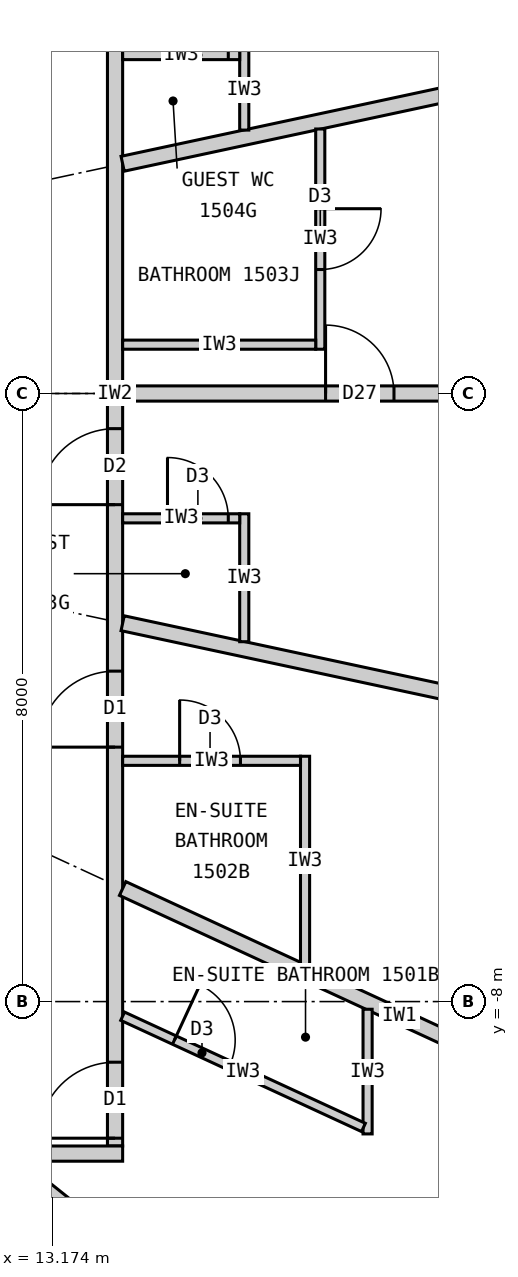
"""IFC4 building model, lengths in metres.
Left out: names, types, materials, properties, quantities, classifications, styles, units other than length and angle.
Written with IfcOpenShell. Run it as: python <this file> out.ifc"""

import sys

from ifc_helpers import new_model, si_unit, direction, frame, frame_2d, origin, place, context, subcontext, project, spatial, rectangle, extrude, element, fill, save


model = new_model("IFC4")
c1 = context("Model", 3, precision=1e-05, world=origin(), true_north=direction((0.0, 1.0)))
c2 = subcontext(c1, "Body", "Model", "MODEL_VIEW")
j1 = project(units=[si_unit("LENGTHUNIT", "METRE"), si_unit("PLANEANGLEUNIT", "RADIAN")], contexts=[c1])
p1 = place(None, origin())
s1 = spatial("IfcSite", under=j1, at=p1, CompositionType="ELEMENT")
p2 = place(p1, origin())
s2 = spatial("IfcBuilding", under=s1, at=p2, CompositionType="ELEMENT")
p3 = place(p2, frame((0.0, 0.0, 63.9)))
s3 = spatial("IfcBuildingStorey", under=s2, at=p3, CompositionType="ELEMENT", Elevation=63.9)
p4 = place(p3, frame((14.0, -9.9, 0.0), z_axis=(0.0, 0.0, 1.0), x_axis=(0.0, 1.0, 0.0)))
e1 = element("IfcWall", 1, at=p4, inside=s3, PredefinedType="PARTITIONING", context=c2, shape_type="SweptSolid", body=[
    extrude(rectangle(XDim=19.8, YDim=0.2, at=frame_2d((9.9, 0.0))), origin(), (0.0, 0.0, 1.0), 3.12),
])
p5 = place(p4, frame((0.103, 0.0, 0.0)))
e2 = element("IfcOpeningElement", 2, at=p5, cuts=e1, PredefinedType="OPENING", context=c2, shape_type="SweptSolid", body=[
    extrude(rectangle(XDim=1.0, YDim=2.2, at=frame_2d((0.5, 1.1))), frame((0.0, 0.11, 0.0), z_axis=(0.0, -1.0, 0.0), x_axis=(1.0, 0.0, 0.0)), (0.0, 0.0, 1.0), 0.22),
])
p6 = place(p4, frame((5.248, 0.0, 0.0)))
e3 = element("IfcOpeningElement", 3, at=p6, cuts=e1, PredefinedType="OPENING", context=c2, shape_type="SweptSolid", body=[
    extrude(rectangle(XDim=1.0, YDim=2.2, at=frame_2d((0.5, 1.1))), frame((0.0, 0.11, 0.0), z_axis=(0.0, -1.0, 0.0), x_axis=(1.0, 0.0, 0.0)), (0.0, 0.0, 1.0), 0.22),
])
p7 = place(p4, frame((8.438, 0.0, 0.0)))
e4 = element("IfcOpeningElement", 4, at=p7, cuts=e1, PredefinedType="OPENING", context=c2, shape_type="SweptSolid", body=[
    extrude(rectangle(XDim=1.0, YDim=2.2, at=frame_2d((0.5, 1.1))), frame((0.0, 0.11, 0.0), z_axis=(0.0, -1.0, 0.0), x_axis=(1.0, 0.0, 0.0)), (0.0, 0.0, 1.0), 0.22),
])
p8 = place(p4, frame((14.532, 0.0, 0.0)))
e5 = element("IfcOpeningElement", 5, at=p8, cuts=e1, PredefinedType="OPENING", context=c2, shape_type="SweptSolid", body=[
    extrude(rectangle(XDim=1.0, YDim=2.2, at=frame_2d((0.5, 1.1))), frame((0.0, 0.11, 0.0), z_axis=(0.0, -1.0, 0.0), x_axis=(1.0, 0.0, 0.0)), (0.0, 0.0, 1.0), 0.22),
])
p9 = place(p3, frame((14.1, -10.0, 0.0), z_axis=(0.0, 0.0, 1.0), x_axis=(-1.0, 0.0, 0.0)))
e6 = element("IfcWall", 6, at=p9, inside=s3, PredefinedType="PARTITIONING", context=c2, shape_type="SweptSolid", body=[
    extrude(rectangle(XDim=28.2, YDim=0.2, at=frame_2d((14.1, 0.0))), origin(), (0.0, 0.0, 1.0), 3.12),
])
p10 = place(p9, frame((23.865, 0.0, 0.0)))
e7 = element("IfcOpeningElement", 7, at=p10, cuts=e6, PredefinedType="OPENING", context=c2, shape_type="SweptSolid", body=[
    extrude(rectangle(XDim=1.0, YDim=2.2, at=frame_2d((0.5, 1.1))), frame((0.0, 0.11, 0.0), z_axis=(0.0, -1.0, 0.0), x_axis=(1.0, 0.0, 0.0)), (0.0, 0.0, 1.0), 0.22),
])
p11 = place(p9, frame((18.529, 0.0, 0.0)))
e8 = element("IfcOpeningElement", 8, at=p11, cuts=e6, PredefinedType="OPENING", context=c2, shape_type="SweptSolid", body=[
    extrude(rectangle(XDim=1.0, YDim=2.2, at=frame_2d((0.5, 1.1))), frame((0.0, 0.11, 0.0), z_axis=(0.0, -1.0, 0.0), x_axis=(1.0, 0.0, 0.0)), (0.0, 0.0, 1.0), 0.22),
])
p12 = place(p9, frame((14.623, 0.0, 0.0)))
e9 = element("IfcOpeningElement", 9, at=p12, cuts=e6, PredefinedType="OPENING", context=c2, shape_type="SweptSolid", body=[
    extrude(rectangle(XDim=1.0, YDim=2.2, at=frame_2d((0.5, 1.1))), frame((0.0, 0.11, 0.0), z_axis=(0.0, -1.0, 0.0), x_axis=(1.0, 0.0, 0.0)), (0.0, 0.0, 1.0), 0.22),
])
p13 = place(p9, frame((11.24, 0.0, 0.0)))
e10 = element("IfcOpeningElement", 10, at=p13, cuts=e6, PredefinedType="OPENING", context=c2, shape_type="SweptSolid", body=[
    extrude(rectangle(XDim=1.0, YDim=2.2, at=frame_2d((0.5, 1.1))), frame((0.0, 0.11, 0.0), z_axis=(0.0, -1.0, 0.0), x_axis=(1.0, 0.0, 0.0)), (0.0, 0.0, 1.0), 0.22),
])
p14 = place(p9, frame((8.671, 0.0, 0.0)))
e11 = element("IfcOpeningElement", 11, at=p14, cuts=e6, PredefinedType="OPENING", context=c2, shape_type="SweptSolid", body=[
    extrude(rectangle(XDim=1.0, YDim=2.2, at=frame_2d((0.5, 1.1))), frame((0.0, 0.11, 0.0), z_axis=(0.0, -1.0, 0.0), x_axis=(1.0, 0.0, 0.0)), (0.0, 0.0, 1.0), 0.22),
])
p15 = place(p9, frame((2.801, 0.0, 0.0)))
e12 = element("IfcOpeningElement", 12, at=p15, cuts=e6, PredefinedType="OPENING", context=c2, shape_type="SweptSolid", body=[
    extrude(rectangle(XDim=1.0, YDim=2.2, at=frame_2d((0.5, 1.1))), frame((0.0, 0.11, 0.0), z_axis=(0.0, -1.0, 0.0), x_axis=(1.0, 0.0, 0.0)), (0.0, 0.0, 1.0), 0.22),
])
p16 = place(p3, frame((14.1, 0.0, 0.0), z_axis=(0.0, 0.0, 1.0), x_axis=(1.0, 0.0, 0.0)))
e13 = element("IfcWall", 13, at=p16, inside=s3, PredefinedType="PARTITIONING", context=c2, shape_type="SweptSolid", body=[
    extrude(rectangle(XDim=10.75, YDim=0.2, at=frame_2d((5.375, 0.0))), origin(), (0.0, 0.0, 1.0), 2.27),
])
p17 = place(p16, frame((2.67, 0.0, 0.0)))
e14 = element("IfcOpeningElement", 14, at=p17, cuts=e13, PredefinedType="OPENING", context=c2, shape_type="SweptSolid", body=[
    extrude(rectangle(XDim=0.9, YDim=2.1, at=frame_2d((0.45, 1.05))), frame((0.0, 0.11, 0.0), z_axis=(0.0, -1.0, 0.0), x_axis=(1.0, 0.0, 0.0)), (0.0, 0.0, 1.0), 0.22),
])
p18 = place(p3, frame((14.1, 3.022, 0.0), z_axis=(0.0, 0.0, 1.0), x_axis=(0.977790014929, 0.209586943072, 0.0)))
e15 = element("IfcWall", 15, at=p18, inside=s3, PredefinedType="PARTITIONING", context=c2, shape_type="SweptSolid", body=[
    extrude(rectangle(XDim=10.087, YDim=0.2, at=frame_2d((5.043, 0.0))), origin(), (0.0, 0.0, 1.0), 2.32),
])
p19 = place(p3, frame((12.625, -10.1, 0.0), z_axis=(0.0, 0.0, 1.0), x_axis=(0.780892451574, -0.624665493744, 0.0)))
e16 = element("IfcWall", 16, at=p19, inside=s3, PredefinedType="PARTITIONING", context=c2, shape_type="SweptSolid", body=[
    extrude(rectangle(XDim=6.045, YDim=0.2, at=frame_2d((3.022, 0.0))), origin(), (0.0, 0.0, 1.0), 2.32),
])
p20 = place(p3, frame((14.1, -6.512, 0.0), z_axis=(0.0, 0.0, 1.0), x_axis=(0.907832871056, -0.419332181247, 0.0)))
e17 = element("IfcWall", 17, at=p20, inside=s3, PredefinedType="PARTITIONING", context=c2, shape_type="SweptSolid", body=[
    extrude(rectangle(XDim=8.023, YDim=0.2, at=frame_2d((4.011, 0.0))), origin(), (0.0, 0.0, 1.0), 2.32),
])
p21 = place(p3, frame((14.1, -3.022, 0.0), z_axis=(0.0, 0.0, 1.0), x_axis=(0.977790014929, -0.209586943072, 0.0)))
e18 = element("IfcWall", 18, at=p21, inside=s3, PredefinedType="PARTITIONING", context=c2, shape_type="SweptSolid", body=[
    extrude(rectangle(XDim=10.087, YDim=0.2, at=frame_2d((5.043, 0.0))), origin(), (0.0, 0.0, 1.0), 2.32),
])
p22 = place(p3, frame((17.323, -8.101, 0.0), z_axis=(0.0, 0.0, 1.0), x_axis=(0.0, -1.0, 0.0)))
e19 = element("IfcWall", 19, at=p22, inside=s3, PredefinedType="PARTITIONING", context=c2, shape_type="SweptSolid", body=[
    extrude(rectangle(XDim=1.64, YDim=0.12, at=frame_2d((0.82, 0.0))), origin(), (0.0, 0.0, 1.0), 3.12),
])
p23 = place(p3, frame((14.1, -8.193, 0.0), z_axis=(0.0, 0.0, 1.0), x_axis=(0.907836493557, -0.419324338628, 0.0)))
e20 = element("IfcWall", 20, at=p23, inside=s3, PredefinedType="PARTITIONING", context=c2, shape_type="SweptSolid", body=[
    extrude(rectangle(XDim=3.49, YDim=0.12, at=frame_2d((1.745, 0.0))), origin(), (0.0, 0.0, 1.0), 3.12),
])
p24 = place(p23, frame((0.75, 0.0, 0.0)))
e21 = element("IfcOpeningElement", 21, at=p24, cuts=e20, PredefinedType="OPENING", context=c2, shape_type="SweptSolid", body=[
    extrude(rectangle(XDim=0.8, YDim=2.1, at=frame_2d((0.4, 1.05))), frame((0.0, 0.07, 0.0), z_axis=(0.0, -1.0, 0.0), x_axis=(1.0, 0.0, 0.0)), (0.0, 0.0, 1.0), 0.14),
])
p25 = place(p3, frame((16.5, -7.521, 0.0), z_axis=(0.0, 0.0, 1.0), x_axis=(0.0, 1.0, 0.0)))
e22 = element("IfcWall", 22, at=p25, inside=s3, PredefinedType="PARTITIONING", context=c2, shape_type="SweptSolid", body=[
    extrude(rectangle(XDim=2.749, YDim=0.12, at=frame_2d((1.374, 0.0))), origin(), (0.0, 0.0, 1.0), 3.12),
])
p26 = place(p3, frame((14.1, -4.833, 0.0), z_axis=(0.0, 0.0, 1.0), x_axis=(1.0, 0.0, 0.0)))
e23 = element("IfcWall", 23, at=p26, inside=s3, PredefinedType="PARTITIONING", context=c2, shape_type="SweptSolid", body=[
    extrude(rectangle(XDim=2.34, YDim=0.12, at=frame_2d((1.17, 0.0))), origin(), (0.0, 0.0, 1.0), 3.12),
])
p27 = place(p26, frame((0.75, 0.0, 0.0)))
e24 = element("IfcOpeningElement", 24, at=p27, cuts=e23, PredefinedType="OPENING", context=c2, shape_type="SweptSolid", body=[
    extrude(rectangle(XDim=0.8, YDim=2.1, at=frame_2d((0.4, 1.05))), frame((0.0, 0.07, 0.0), z_axis=(0.0, -1.0, 0.0), x_axis=(1.0, 0.0, 0.0)), (0.0, 0.0, 1.0), 0.14),
])
p28 = place(p3, frame((15.7, -3.265, 0.0), z_axis=(0.0, 0.0, 1.0), x_axis=(0.0, 1.0, 0.0)))
e25 = element("IfcWall", 25, at=p28, inside=s3, PredefinedType="PARTITIONING", context=c2, shape_type="SweptSolid", body=[
    extrude(rectangle(XDim=1.683, YDim=0.12, at=frame_2d((0.841, 0.0))), origin(), (0.0, 0.0, 1.0), 3.12),
])
p29 = place(p3, frame((14.1, -1.643, 0.0), z_axis=(0.0, 0.0, 1.0), x_axis=(1.0, 0.0, 0.0)))
e26 = element("IfcWall", 26, at=p29, inside=s3, PredefinedType="PARTITIONING", context=c2, shape_type="SweptSolid", body=[
    extrude(rectangle(XDim=1.54, YDim=0.12, at=frame_2d((0.77, 0.0))), origin(), (0.0, 0.0, 1.0), 2.32),
])
p30 = place(p29, frame((0.59, 0.0, 0.0)))
e27 = element("IfcOpeningElement", 27, at=p30, cuts=e26, PredefinedType="OPENING", context=c2, shape_type="SweptSolid", body=[
    extrude(rectangle(XDim=0.8, YDim=2.1, at=frame_2d((0.4, 1.05))), frame((0.0, 0.07, 0.0), z_axis=(0.0, -1.0, 0.0), x_axis=(1.0, 0.0, 0.0)), (0.0, 0.0, 1.0), 0.14),
])
p31 = place(p3, frame((16.7, 3.48, 0.0), z_axis=(0.0, 0.0, 1.0), x_axis=(0.0, -1.0, 0.0)))
e28 = element("IfcWall", 28, at=p31, inside=s3, PredefinedType="PARTITIONING", context=c2, shape_type="SweptSolid", body=[
    extrude(rectangle(XDim=2.897, YDim=0.12, at=frame_2d((1.449, 0.0))), origin(), (0.0, 0.0, 1.0), 3.12),
])
p32 = place(p31, frame((1.049, 0.0, 0.0)))
e29 = element("IfcOpeningElement", 29, at=p32, cuts=e28, PredefinedType="OPENING", context=c2, shape_type="SweptSolid", body=[
    extrude(rectangle(XDim=0.8, YDim=2.1, at=frame_2d((0.4, 1.05))), frame((0.0, 0.07, 0.0), z_axis=(0.0, -1.0, 0.0), x_axis=(1.0, 0.0, 0.0)), (0.0, 0.0, 1.0), 0.14),
])
p33 = place(p3, frame((14.1, 0.643, 0.0), z_axis=(0.0, 0.0, 1.0), x_axis=(1.0, 0.0, 0.0)))
e30 = element("IfcWall", 30, at=p33, inside=s3, PredefinedType="PARTITIONING", context=c2, shape_type="SweptSolid", body=[
    extrude(rectangle(XDim=2.54, YDim=0.12, at=frame_2d((1.27, 0.0))), origin(), (0.0, 0.0, 1.0), 3.12),
])
p34 = place(p3, frame((15.7, 3.465, 0.0), z_axis=(0.0, 0.0, 1.0), x_axis=(0.0, 1.0, 0.0)))
e31 = element("IfcWall", 31, at=p34, inside=s3, PredefinedType="PARTITIONING", context=c2, shape_type="SweptSolid", body=[
    extrude(rectangle(XDim=1.047, YDim=0.12, at=frame_2d((0.523, 0.0))), origin(), (0.0, 0.0, 1.0), 3.12),
])
p35 = place(p3, frame((14.1, 4.452, 0.0), z_axis=(0.0, 0.0, 1.0), x_axis=(1.0, 0.0, 0.0)))
e32 = element("IfcWall", 32, at=p35, inside=s3, PredefinedType="PARTITIONING", context=c2, shape_type="SweptSolid", body=[
    extrude(rectangle(XDim=1.54, YDim=0.12, at=frame_2d((0.77, 0.0))), origin(), (0.0, 0.0, 1.0), 3.12),
])
p36 = place(p35, frame((0.59, 0.0, 0.0)))
e33 = element("IfcOpeningElement", 33, at=p36, cuts=e32, PredefinedType="OPENING", context=c2, shape_type="SweptSolid", body=[
    extrude(rectangle(XDim=0.8, YDim=2.1, at=frame_2d((0.4, 1.05))), frame((0.0, 0.07, 0.0), z_axis=(0.0, -1.0, 0.0), x_axis=(1.0, 0.0, 0.0)), (0.0, 0.0, 1.0), 0.14),
])
p37 = place(p24, origin())
e34 = element("IfcDoor", 34, at=p37, inside=s3, OperationType="SINGLE_SWING_LEFT", PredefinedType="DOOR", context=c2, shape_type="SweptSolid", body=[
    extrude(rectangle(XDim=0.8, YDim=2.1, at=frame_2d((0.4, 1.05))), frame((0.0, 0.025, 0.0), z_axis=(0.0, -1.0, 0.0), x_axis=(1.0, 0.0, 0.0)), (0.0, 0.0, 1.0), 0.05),
])
fill(e21, e34)
p38 = place(p5, origin())
e35 = element("IfcDoor", 35, at=p38, inside=s3, OperationType="SINGLE_SWING_LEFT", PredefinedType="DOOR", context=c2, shape_type="SweptSolid", body=[
    extrude(rectangle(XDim=1.0, YDim=2.2, at=frame_2d((0.5, 1.1))), frame((0.0, 0.025, 0.0), z_axis=(0.0, -1.0, 0.0), x_axis=(1.0, 0.0, 0.0)), (0.0, 0.0, 1.0), 0.05),
])
fill(e2, e35)
p39 = place(p27, origin())
e36 = element("IfcDoor", 36, at=p39, inside=s3, OperationType="SINGLE_SWING_LEFT", PredefinedType="DOOR", context=c2, shape_type="SweptSolid", body=[
    extrude(rectangle(XDim=0.8, YDim=2.1, at=frame_2d((0.4, 1.05))), frame((0.0, 0.025, 0.0), z_axis=(0.0, -1.0, 0.0), x_axis=(1.0, 0.0, 0.0)), (0.0, 0.0, 1.0), 0.05),
])
fill(e24, e36)
p40 = place(p6, origin())
e37 = element("IfcDoor", 37, at=p40, inside=s3, OperationType="SINGLE_SWING_LEFT", PredefinedType="DOOR", context=c2, shape_type="SweptSolid", body=[
    extrude(rectangle(XDim=1.0, YDim=2.2, at=frame_2d((0.5, 1.1))), frame((0.0, 0.025, 0.0), z_axis=(0.0, -1.0, 0.0), x_axis=(1.0, 0.0, 0.0)), (0.0, 0.0, 1.0), 0.05),
])
fill(e3, e37)
p41 = place(p30, origin())
e38 = element("IfcDoor", 38, at=p41, inside=s3, OperationType="SINGLE_SWING_LEFT", PredefinedType="DOOR", context=c2, shape_type="SweptSolid", body=[
    extrude(rectangle(XDim=0.8, YDim=2.1, at=frame_2d((0.4, 1.05))), frame((0.0, 0.025, 0.0), z_axis=(0.0, -1.0, 0.0), x_axis=(1.0, 0.0, 0.0)), (0.0, 0.0, 1.0), 0.05),
])
fill(e27, e38)
p42 = place(p7, origin())
e39 = element("IfcDoor", 39, at=p42, inside=s3, OperationType="SINGLE_SWING_LEFT", PredefinedType="DOOR", context=c2, shape_type="SweptSolid", body=[
    extrude(rectangle(XDim=1.0, YDim=2.2, at=frame_2d((0.5, 1.1))), frame((0.0, 0.025, 0.0), z_axis=(0.0, -1.0, 0.0), x_axis=(1.0, 0.0, 0.0)), (0.0, 0.0, 1.0), 0.05),
])
fill(e4, e39)
p43 = place(p32, origin())
e40 = element("IfcDoor", 40, at=p43, inside=s3, OperationType="SINGLE_SWING_LEFT", PredefinedType="DOOR", context=c2, shape_type="SweptSolid", body=[
    extrude(rectangle(XDim=0.8, YDim=2.1, at=frame_2d((0.4, 1.05))), frame((0.0, 0.025, 0.0), z_axis=(0.0, -1.0, 0.0), x_axis=(1.0, 0.0, 0.0)), (0.0, 0.0, 1.0), 0.05),
])
fill(e29, e40)
p44 = place(p17, origin())
e41 = element("IfcDoor", 41, at=p44, inside=s3, OperationType="SINGLE_SWING_LEFT", PredefinedType="DOOR", context=c2, shape_type="SweptSolid", body=[
    extrude(rectangle(XDim=0.9, YDim=2.1, at=frame_2d((0.45, 1.05))), frame((0.0, 0.025, 0.0), z_axis=(0.0, -1.0, 0.0), x_axis=(1.0, 0.0, 0.0)), (0.0, 0.0, 1.0), 0.05),
])
fill(e14, e41)
p45 = place(p36, origin())
e42 = element("IfcDoor", 42, at=p45, inside=s3, OperationType="SINGLE_SWING_LEFT", PredefinedType="DOOR", context=c2, shape_type="SweptSolid", body=[
    extrude(rectangle(XDim=0.8, YDim=2.1, at=frame_2d((0.4, 1.05))), frame((0.0, 0.025, 0.0), z_axis=(0.0, -1.0, 0.0), x_axis=(1.0, 0.0, 0.0)), (0.0, 0.0, 1.0), 0.05),
])
fill(e33, e42)
save(model, sys.argv[1])
